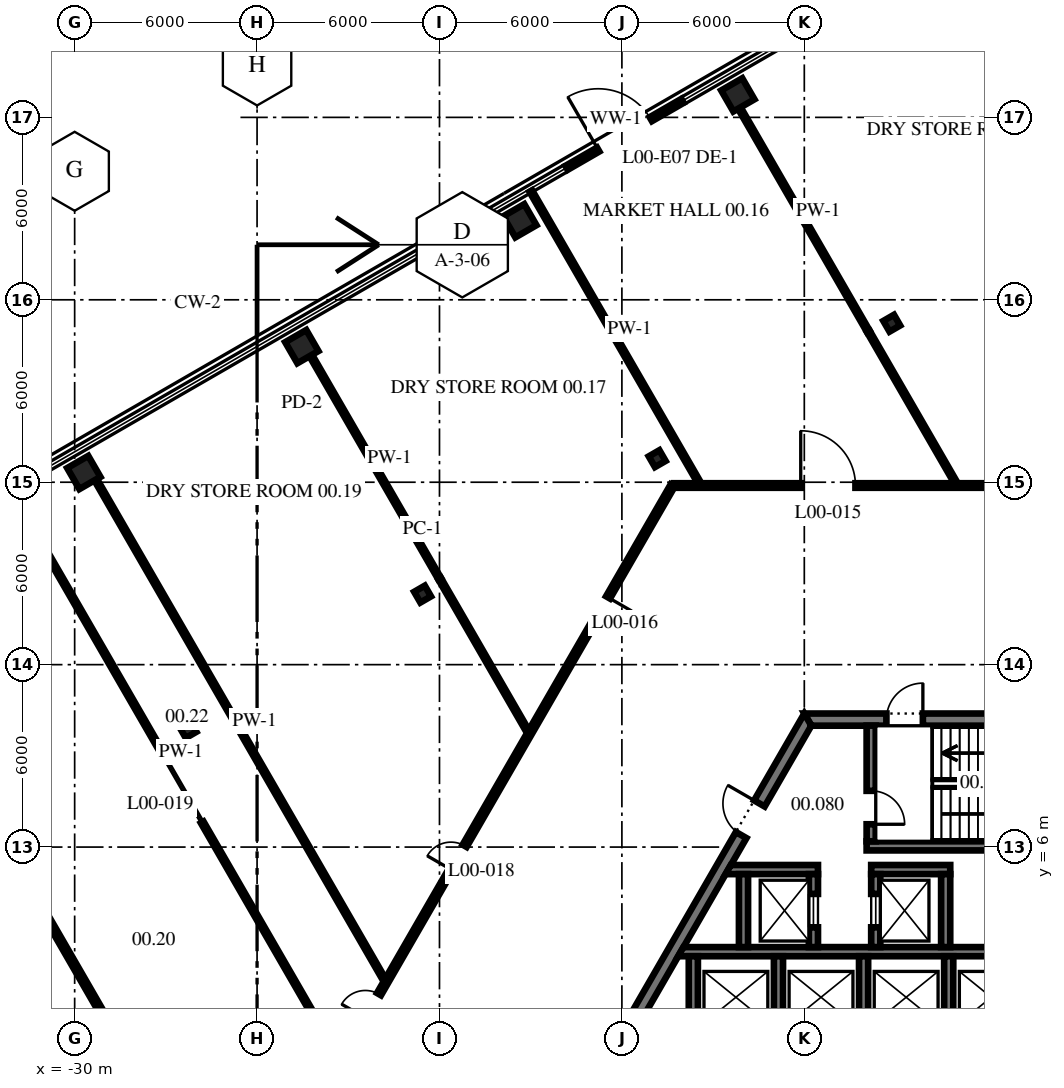
"""IFC4 building model, lengths in metres.
Left out: names, types, materials, properties, quantities, classifications, styles, units other than length and angle.
Written with IfcOpenShell. Run it as: python <this file> out.ifc"""

import sys

from ifc_helpers import new_model, si_unit, direction, frame, frame_2d, origin, origin_2d, place, context, subcontext, project, spatial, polyline, rectangle, i_section, outline, extrude, source, transform, mapped, element, fill, save


model = new_model("IFC4")
c1 = context("Model", 3, precision=1e-05, world=origin(), true_north=direction((0.0, 1.0)))
c2 = subcontext(c1, "Body", "Model", "MODEL_VIEW")
j1 = project(units=[si_unit("LENGTHUNIT", "METRE"), si_unit("PLANEANGLEUNIT", "RADIAN")], contexts=[c1])
p1 = place(None, origin())
s1 = spatial("IfcSite", under=j1, at=p1, CompositionType="ELEMENT")
p2 = place(p1, origin())
s2 = spatial("IfcBuilding", under=s1, at=p2, CompositionType="ELEMENT")
p3 = place(p2, origin())
s3 = spatial("IfcBuildingStorey", under=s2, at=p3, CompositionType="ELEMENT", Elevation=0.0)
m1 = source(origin(), c2, "Body", "SweptSolid", [
    extrude(i_section(OverallWidth=0.404, OverallDepth=0.406, WebThickness=0.027, FlangeThickness=0.044, at=origin_2d()), origin(), (0.0, 0.0, 1.0), 7.2),
])
for number, where, z_axis, x_axis in (
    (1, (-3.124, 23.23, -0.2), (0.0, 0.0, 1.0), (-0.866, -0.5, 0.0)),
    (2, (-10.84, 18.775, -0.2), (0.0, 0.0, 1.0), (-0.866, -0.5, 0.0)),
    (3, (-18.556, 14.32, -0.2), (0.0, 0.0, 1.0), (-0.866, -0.5, 0.0)),
    (4, (-26.272, 9.865, -0.2), (0.0, 0.0, 1.0), (-0.866, -0.5, 0.0)),
):
    element("IfcColumn", number, at=place(p3, frame(where, z_axis=z_axis, x_axis=x_axis)), inside=s3, PredefinedType="COLUMN", context=c2, shape_type="MappedRepresentation", body=[
        mapped(m1, transform((0.0, 0.0, 0.0), scale=1.0)),
    ])
m2 = source(origin(), c2, "Body", "SweptSolid", [
    extrude(rectangle(XDim=0.8, YDim=0.8, at=origin_2d()), origin(), (0.0, 0.0, 1.0), 7.2),
])
for number, where, z_axis, x_axis in (
    (5, (-8.187, 30.74, -0.2), (0.0, 0.0, 1.0), (-0.866, -0.5, 0.0)),
    (6, (-15.357, 26.6, -0.2), (0.0, 0.0, 1.0), (-0.866, -0.5, 0.0)),
    (7, (-22.528, 22.46, -0.2), (0.0, 0.0, 1.0), (-0.866, -0.5, 0.0)),
    (8, (-29.699, 18.32, -0.2), (0.0, 0.0, 1.0), (-0.866, -0.5, 0.0)),
):
    element("IfcColumn", number, at=place(p3, frame(where, z_axis=z_axis, x_axis=x_axis)), inside=s3, PredefinedType="COLUMN", context=c2, shape_type="MappedRepresentation", body=[
        mapped(m2, transform((0.0, 0.0, 0.0), scale=1.0)),
    ])
m3 = source(origin(), c2, "Body", "SweptSolid", [
    extrude(outline(polyline([(-0.115, -0.2), (11.885, -0.2), (11.654, 0.2), (0.115, 0.2), (-0.115, -0.2)])), origin(), (0.0, 0.0, 1.0), 7.0),
])
p4 = place(p3, frame((5.885, 10.192, -0.2), z_axis=(0.0, 0.0, 1.0), x_axis=(-1.0, 0.0, 0.0)))
e9 = element("IfcWall", 9, at=p4, inside=s3, PredefinedType="SHEAR", context=c2, shape_type="MappedRepresentation", body=[
    mapped(m3, transform((0.0, 0.0, 0.0), scale=1.0)),
])
p5 = place(p4, frame((7.985, 0.0, 0.2)))
e10 = element("IfcOpeningElement", 10, at=p5, cuts=e9, PredefinedType="OPENING", context=c2, shape_type="SweptSolid", body=[
    extrude(rectangle(XDim=1.2, YDim=2.1, at=frame_2d((0.6, 1.05))), frame((0.0, 0.21, 0.0), z_axis=(0.0, -1.0, 0.0), x_axis=(1.0, 0.0, 0.0)), (0.0, 0.0, 1.0), 0.42),
])
p6 = place(p3, frame((-5.885, 10.192, -0.2), z_axis=(0.0, 0.0, 1.0), x_axis=(-0.499996592174, -0.866027371285, 0.0)))
e11 = element("IfcWall", 11, at=p6, inside=s3, PredefinedType="SHEAR", context=c2, shape_type="MappedRepresentation", body=[
    mapped(m3, transform((0.0, 0.0, 0.0), scale=1.0)),
])
p7 = place(p6, frame((3.185, 0.0, 0.2)))
e12 = element("IfcOpeningElement", 12, at=p7, cuts=e11, PredefinedType="OPENING", context=c2, shape_type="SweptSolid", body=[
    extrude(rectangle(XDim=1.2, YDim=2.1, at=frame_2d((0.6, 1.05))), frame((0.0, 0.21, 0.0), z_axis=(0.0, -1.0, 0.0), x_axis=(1.0, 0.0, 0.0)), (0.0, 0.0, 1.0), 0.42),
])
p8 = place(p3, frame((-9.8, 2.56, -0.2), z_axis=(0.0, 0.0, 1.0), x_axis=(1.0, 0.0, 0.0)))
e13 = element("IfcWall", 13, at=p8, inside=s3, PredefinedType="SHEAR", context=c2, shape_type="SweptSolid", body=[
    extrude(outline(polyline([(11.2, -0.15), (-0.349, -0.15), (-0.176, 0.15), (11.2, 0.15), (11.2, -0.15)])), origin(), (0.0, 0.0, 1.0), 7.0),
])
m4 = source(origin(), c2, "Body", "SweptSolid", [
    extrude(rectangle(XDim=2.2, YDim=0.3, at=frame_2d((1.1, 0.0))), origin(), (0.0, 0.0, 1.0), 7.0),
])
p9 = place(p3, frame((-9.65, 0.21, -0.2), z_axis=(0.0, 0.0, 1.0), x_axis=(0.0, 1.0, 0.0)))
e14 = element("IfcWall", 14, at=p9, inside=s3, PredefinedType="SHEAR", context=c2, shape_type="MappedRepresentation", body=[
    mapped(m4, transform((0.0, 0.0, 0.0), scale=1.0)),
])
p10 = place(p3, frame((-3.95, 6.04, -0.2), z_axis=(0.0, 0.0, 1.0), x_axis=(1.0, 0.0, 0.0)))
e15 = element("IfcWall", 15, at=p10, inside=s3, PredefinedType="SHEAR", context=c2, shape_type="SweptSolid", body=[
    extrude(rectangle(XDim=7.9, YDim=0.3, at=frame_2d((3.95, 0.0))), origin(), (0.0, 0.0, 1.0), 7.0),
])
m5 = source(origin(), c2, "Body", "SweptSolid", [
    extrude(outline(polyline([(0.0, -0.15), (0.0, 0.15), (3.804, 0.15), (3.804, -0.15), (0.0, -0.15)])), origin(), (0.0, 0.0, 1.0), 7.0),
])
p11 = place(p3, frame((-3.8, 6.19, -0.2), z_axis=(0.0, 0.0, 1.0), x_axis=(0.0, 1.0, 0.0)))
e16 = element("IfcWall", 16, at=p11, inside=s3, PredefinedType="SHEAR", context=c2, shape_type="MappedRepresentation", body=[
    mapped(m5, transform((0.0, 0.0, 0.0), scale=1.0)),
])
p12 = place(p11, frame((0.56, 0.0, 0.2)))
e17 = element("IfcOpeningElement", 17, at=p12, cuts=e16, PredefinedType="OPENING", context=c2, shape_type="SweptSolid", body=[
    extrude(rectangle(XDim=1.1, YDim=2.1, at=frame_2d((0.55, 1.05))), frame((0.0, 0.16, 0.0), z_axis=(0.0, -1.0, 0.0), x_axis=(1.0, 0.0, 0.0)), (0.0, 0.0, 1.0), 0.32),
])
p13 = place(p3, frame((-8.15, 5.26, -0.2), z_axis=(0.0, 0.0, 1.0), x_axis=(1.0, 0.0, 0.0)))
e18 = element("IfcWall", 18, at=p13, inside=s3, PredefinedType="SHEAR", context=c2, shape_type="SweptSolid", body=[
    extrude(outline(polyline([(2.6, -0.15), (-0.44, -0.15), (-0.267, 0.15), (2.6, 0.15), (2.6, -0.15)])), origin(), (0.0, 0.0, 1.0), 7.0),
])
m6 = source(origin(), c2, "Body", "SweptSolid", [
    extrude(rectangle(XDim=2.4, YDim=0.3, at=frame_2d((1.2, 0.0))), origin(), (0.0, 0.0, 1.0), 7.0),
])
p14 = place(p3, frame((-8.0, 2.71, -0.2), z_axis=(0.0, 0.0, 1.0), x_axis=(0.0, 1.0, 0.0)))
e19 = element("IfcWall", 19, at=p14, inside=s3, PredefinedType="SHEAR", context=c2, shape_type="MappedRepresentation", body=[
    mapped(m6, transform((0.0, 0.0, 0.0), scale=1.0)),
])
p15 = place(p3, frame((-5.7, 2.71, -0.2), z_axis=(0.0, 0.0, 1.0), x_axis=(0.0, 1.0, 0.0)))
e20 = element("IfcWall", 20, at=p15, inside=s3, PredefinedType="SHEAR", context=c2, shape_type="MappedRepresentation", body=[
    mapped(m6, transform((0.0, 0.0, 0.0), scale=1.0)),
])
p16 = place(p15, frame((0.65, 0.0, 0.2)))
e21 = element("IfcOpeningElement", 21, at=p16, cuts=e20, PredefinedType="OPENING", context=c2, shape_type="SweptSolid", body=[
    extrude(rectangle(XDim=1.1, YDim=2.1, at=frame_2d((0.55, 1.05))), frame((0.0, 0.16, 0.0), z_axis=(0.0, -1.0, 0.0), x_axis=(1.0, 0.0, 0.0)), (0.0, 0.0, 1.0), 0.32),
])
p17 = place(p3, frame((-3.8, 5.26, -0.2), z_axis=(0.0, 0.0, 1.0), x_axis=(1.0, 0.0, 0.0)))
e22 = element("IfcWall", 22, at=p17, inside=s3, PredefinedType="SHEAR", context=c2, shape_type="SweptSolid", body=[
    extrude(rectangle(XDim=2.6, YDim=0.3, at=frame_2d((1.3, 0.0))), origin(), (0.0, 0.0, 1.0), 7.0),
])
p18 = place(p3, frame((-3.65, 2.71, -0.2), z_axis=(0.0, 0.0, 1.0), x_axis=(0.0, 1.0, 0.0)))
e23 = element("IfcWall", 23, at=p18, inside=s3, PredefinedType="SHEAR", context=c2, shape_type="MappedRepresentation", body=[
    mapped(m6, transform((0.0, 0.0, 0.0), scale=1.0)),
])
p19 = place(p18, frame((0.65, 0.0, 0.2)))
e24 = element("IfcOpeningElement", 24, at=p19, cuts=e23, PredefinedType="OPENING", context=c2, shape_type="SweptSolid", body=[
    extrude(rectangle(XDim=1.1, YDim=2.1, at=frame_2d((0.55, 1.05))), frame((0.0, 0.16, 0.0), z_axis=(0.0, -1.0, 0.0), x_axis=(1.0, 0.0, 0.0)), (0.0, 0.0, 1.0), 0.32),
])
p20 = place(p3, frame((-1.35, 2.71, -0.2), z_axis=(0.0, 0.0, 1.0), x_axis=(0.0, 1.0, 0.0)))
e25 = element("IfcWall", 25, at=p20, inside=s3, PredefinedType="SHEAR", context=c2, shape_type="MappedRepresentation", body=[
    mapped(m6, transform((0.0, 0.0, 0.0), scale=1.0)),
])
for number, where, z_axis, x_axis in (
    (26, (-6.85, 0.21, -0.2), (0.0, 0.0, 1.0), (0.0, 1.0, 0.0)),
    (27, (-4.05, 0.21, -0.2), (0.0, 0.0, 1.0), (0.0, 1.0, 0.0)),
    (28, (-1.25, 0.21, -0.2), (0.0, 0.0, 1.0), (0.0, 1.0, 0.0)),
):
    element("IfcWall", number, at=place(p3, frame(where, z_axis=z_axis, x_axis=x_axis)), inside=s3, PredefinedType="SHEAR", context=c2, shape_type="MappedRepresentation", body=[
        mapped(m4, transform((0.0, 0.0, 0.0), scale=1.0)),
    ])
p21 = place(p3, frame((-13.821, 28.341, 0.0), z_axis=(0.0, 0.0, 1.0), x_axis=(0.866012896985, 0.500021661786, 0.0)))
e29 = element("IfcWall", 29, at=p21, inside=s3, PredefinedType="ELEMENTEDWALL", context=c2, shape_type="SweptSolid", body=[
    extrude(rectangle(XDim=4.403, YDim=0.15, at=frame_2d((2.201, 0.0))), origin(), (0.0, 0.0, 1.0), 6.8),
])
p22 = place(p21, frame((1.201, 0.0, 0.0)))
e30 = element("IfcOpeningElement", 30, at=p22, cuts=e29, PredefinedType="OPENING", context=c2, shape_type="SweptSolid", body=[
    extrude(rectangle(XDim=2.0, YDim=2.7, at=frame_2d((1.0, 1.35))), frame((0.0, 0.085, 0.0), z_axis=(0.0, -1.0, 0.0), x_axis=(1.0, 0.0, 0.0)), (0.0, 0.0, 1.0), 0.17),
])
p23 = place(p3, frame((-32.507, 6.444, 0.0), z_axis=(0.0, 0.0, 1.0), x_axis=(0.499996054018, -0.866027681987, 0.0)))
e31 = element("IfcWall", 31, at=p23, inside=s3, PredefinedType="PARTITIONING", context=c2, shape_type="SweptSolid", body=[
    extrude(rectangle(XDim=7.441, YDim=0.15, at=frame_2d((3.72, 0.0))), origin(), (0.0, 0.0, 1.0), 6.8),
])
p24 = place(p3, frame((-32.092, 17.705, 0.0), z_axis=(0.0, 0.0, 1.0), x_axis=(0.500005001938, -0.866022515895, 0.0)))
e32 = element("IfcWall", 32, at=p24, inside=s3, PredefinedType="PARTITIONING", context=c2, shape_type="SweptSolid", body=[
    extrude(rectangle(XDim=20.444, YDim=0.1, at=frame_2d((10.222, 0.0))), origin(), (0.0, 0.0, 1.0), 6.8),
])
p25 = place(p24, frame((10.175, 0.0, 0.0)))
e33 = element("IfcOpeningElement", 33, at=p25, cuts=e32, PredefinedType="OPENING", context=c2, shape_type="SweptSolid", body=[
    extrude(rectangle(XDim=2.4, YDim=2.4, at=frame_2d((1.2, 1.2))), frame((0.0, 0.06, 0.0), z_axis=(0.0, -1.0, 0.0), x_axis=(1.0, 0.0, 0.0)), (0.0, 0.0, 1.0), 0.12),
])
p26 = place(p3, frame((-29.313, 18.092, 0.0), z_axis=(0.0, 0.0, 1.0), x_axis=(0.499998542569, -0.866026245231, 0.0)))
e34 = element("IfcWall", 34, at=p26, inside=s3, PredefinedType="PARTITIONING", context=c2, shape_type="SweptSolid", body=[
    extrude(rectangle(XDim=19.009, YDim=0.1, at=frame_2d((9.504, 0.0))), origin(), (0.0, 0.0, 1.0), 6.8),
])
p27 = place(p3, frame((-22.238, 22.177, 0.0), z_axis=(0.0, 0.0, 1.0), x_axis=(0.500007862672, -0.866020864221, 0.0)))
e35 = element("IfcWall", 35, at=p27, inside=s3, PredefinedType="PARTITIONING", context=c2, shape_type="SweptSolid", body=[
    extrude(rectangle(XDim=8.49, YDim=0.1, at=frame_2d((4.245, 0.0))), origin(), (0.0, 0.0, 1.0), 6.028),
])
p28 = place(p3, frame((-17.993, 14.824, 0.0), z_axis=(0.0, 0.0, 1.0), x_axis=(0.500009032223, -0.866020188965, 0.0)))
e36 = element("IfcWall", 36, at=p28, inside=s3, PredefinedType="PARTITIONING", context=c2, shape_type="SweptSolid", body=[
    extrude(rectangle(XDim=5.801, YDim=0.1, at=frame_2d((2.901, 0.0))), origin(), (0.0, 0.0, 1.0), 6.8),
])
p29 = place(p3, frame((-14.995, 27.576, 0.0), z_axis=(0.0, 0.0, 1.0), x_axis=(0.499993005702, -0.866029441907, 0.0)))
e37 = element("IfcWall", 37, at=p29, inside=s3, PredefinedType="PARTITIONING", context=c2, shape_type="SweptSolid", body=[
    extrude(rectangle(XDim=11.092, YDim=0.1, at=frame_2d((5.546, 0.0))), origin(), (0.0, 0.0, 1.0), 6.8),
])
p30 = place(p3, frame((-8.141, 30.316, 0.0), z_axis=(0.0, 0.0, 1.0), x_axis=(0.499995411839, -0.866028052744, 0.0)))
e38 = element("IfcWall", 38, at=p30, inside=s3, PredefinedType="PARTITIONING", context=c2, shape_type="SweptSolid", body=[
    extrude(rectangle(XDim=8.491, YDim=0.1, at=frame_2d((4.245, 0.0))), origin(), (0.0, 0.0, 1.0), 6.028),
])
p31 = place(p3, frame((-3.896, 22.963, 0.0), z_axis=(0.0, 0.0, 1.0), x_axis=(0.500019361804, -0.866014224953, 0.0)))
e39 = element("IfcWall", 39, at=p31, inside=s3, PredefinedType="PARTITIONING", context=c2, shape_type="SweptSolid", body=[
    extrude(rectangle(XDim=5.765, YDim=0.1, at=frame_2d((2.883, 0.0))), origin(), (0.0, 0.0, 1.0), 6.8),
])
p32 = place(p3, frame((-10.28, 17.892, 0.0), z_axis=(0.0, 0.0, 1.0), x_axis=(1.0, 0.0, 0.0)))
e40 = element("IfcWall", 40, at=p32, inside=s3, PredefinedType="PARTITIONING", context=c2, shape_type="SweptSolid", body=[
    extrude(rectangle(XDim=20.608, YDim=0.15, at=frame_2d((10.304, 0.0))), origin(), (0.0, 0.0, 1.0), 6.8),
])
p33 = place(p32, frame((4.162, 0.0, 0.0)))
e41 = element("IfcOpeningElement", 41, at=p33, cuts=e40, PredefinedType="OPENING", context=c2, shape_type="SweptSolid", body=[
    extrude(rectangle(XDim=1.8, YDim=2.4, at=frame_2d((0.9, 1.2))), frame((0.0, 0.085, 0.0), z_axis=(0.0, -1.0, 0.0), x_axis=(1.0, 0.0, 0.0)), (0.0, 0.0, 1.0), 0.17),
])
p34 = place(p32, frame((14.56, 0.0, 0.0)))
e42 = element("IfcOpeningElement", 42, at=p34, cuts=e40, PredefinedType="OPENING", context=c2, shape_type="SweptSolid", body=[
    extrude(rectangle(XDim=0.9, YDim=2.1, at=frame_2d((0.45, 1.05))), frame((0.0, 0.085, 0.0), z_axis=(0.0, -1.0, 0.0), x_axis=(1.0, 0.0, 0.0)), (0.0, 0.0, 1.0), 0.17),
])
p35 = place(p3, frame((-20.66, 0.0, 0.0), z_axis=(0.0, 0.0, 1.0), x_axis=(0.500006476997, 0.866021664256, 0.0)))
e43 = element("IfcWall", 43, at=p35, inside=s3, PredefinedType="PARTITIONING", context=c2, shape_type="SweptSolid", body=[
    extrude(rectangle(XDim=20.66, YDim=0.15, at=frame_2d((10.33, 0.0))), origin(), (0.0, 0.0, 1.0), 6.8),
])
p36 = place(p35, frame((15.51, 0.0, 0.0)))
e44 = element("IfcOpeningElement", 44, at=p36, cuts=e43, PredefinedType="OPENING", context=c2, shape_type="SweptSolid", body=[
    extrude(rectangle(XDim=0.9, YDim=2.1, at=frame_2d((0.45, 1.05))), frame((0.0, 0.085, 0.0), z_axis=(0.0, -1.0, 0.0), x_axis=(1.0, 0.0, 0.0)), (0.0, 0.0, 1.0), 0.17),
])
p37 = place(p35, frame((6.076, 0.0, 0.0)))
e45 = element("IfcOpeningElement", 45, at=p37, cuts=e43, PredefinedType="OPENING", context=c2, shape_type="SweptSolid", body=[
    extrude(rectangle(XDim=0.9, YDim=2.1, at=frame_2d((0.45, 1.05))), frame((0.0, 0.085, 0.0), z_axis=(0.0, -1.0, 0.0), x_axis=(1.0, 0.0, 0.0)), (0.0, 0.0, 1.0), 0.17),
])
p38 = place(p35, frame((0.442, 0.0, 0.0)))
e46 = element("IfcOpeningElement", 46, at=p38, cuts=e43, PredefinedType="OPENING", context=c2, shape_type="SweptSolid", body=[
    extrude(rectangle(XDim=0.9, YDim=2.1, at=frame_2d((0.45, 1.05))), frame((0.0, 0.085, 0.0), z_axis=(0.0, -1.0, 0.0), x_axis=(1.0, 0.0, 0.0)), (0.0, 0.0, 1.0), 0.17),
])
p39 = place(p5, frame((1.2, 0.0, 0.0), z_axis=(0.0, 0.0, 1.0), x_axis=(-1.0, 0.0, 0.0)))
e47 = element("IfcDoor", 47, at=p39, inside=s3, OperationType="SINGLE_SWING_RIGHT", PredefinedType="DOOR", context=c2, shape_type="SweptSolid", body=[
    extrude(rectangle(XDim=1.2, YDim=2.1, at=frame_2d((0.6, 1.05))), frame((0.0, 0.025, 0.0), z_axis=(0.0, -1.0, 0.0), x_axis=(1.0, 0.0, 0.0)), (0.0, 0.0, 1.0), 0.05),
])
fill(e10, e47)
p40 = place(p7, frame((1.2, 0.0, 0.0), z_axis=(0.0, 0.0, 1.0), x_axis=(-1.0, 0.0, 0.0)))
e48 = element("IfcDoor", 48, at=p40, inside=s3, OperationType="SINGLE_SWING_RIGHT", PredefinedType="DOOR", context=c2, shape_type="SweptSolid", body=[
    extrude(rectangle(XDim=1.2, YDim=2.1, at=frame_2d((0.6, 1.05))), frame((0.0, 0.025, 0.0), z_axis=(0.0, -1.0, 0.0), x_axis=(1.0, 0.0, 0.0)), (0.0, 0.0, 1.0), 0.05),
])
fill(e12, e48)
p41 = place(p12, frame((1.1, 0.0, 0.0), z_axis=(0.0, 0.0, 1.0), x_axis=(-1.0, 0.0, 0.0)))
e49 = element("IfcDoor", 49, at=p41, inside=s3, OperationType="SINGLE_SWING_RIGHT", PredefinedType="DOOR", context=c2, shape_type="SweptSolid", body=[
    extrude(rectangle(XDim=1.1, YDim=2.1, at=frame_2d((0.55, 1.05))), frame((0.0, 0.025, 0.0), z_axis=(0.0, -1.0, 0.0), x_axis=(1.0, 0.0, 0.0)), (0.0, 0.0, 1.0), 0.05),
])
fill(e17, e49)
p42 = place(p16, origin())
e50 = element("IfcDoor", 50, at=p42, inside=s3, OperationType="DOUBLE_DOOR_SLIDING", PredefinedType="DOOR", context=c2, shape_type="SweptSolid", body=[
    extrude(rectangle(XDim=1.1, YDim=2.1, at=frame_2d((0.55, 1.05))), frame((0.0, 0.025, 0.0), z_axis=(0.0, -1.0, 0.0), x_axis=(1.0, 0.0, 0.0)), (0.0, 0.0, 1.0), 0.05),
])
fill(e21, e50)
p43 = place(p19, origin())
e51 = element("IfcDoor", 51, at=p43, inside=s3, OperationType="DOUBLE_DOOR_SLIDING", PredefinedType="DOOR", context=c2, shape_type="SweptSolid", body=[
    extrude(rectangle(XDim=1.1, YDim=2.1, at=frame_2d((0.55, 1.05))), frame((0.0, 0.025, 0.0), z_axis=(0.0, -1.0, 0.0), x_axis=(1.0, 0.0, 0.0)), (0.0, 0.0, 1.0), 0.05),
])
fill(e24, e51)
p44 = place(p22, origin())
e52 = element("IfcDoor", 52, at=p44, inside=s3, OperationType="DOUBLE_DOOR_SINGLE_SWING", PredefinedType="DOOR", context=c2, shape_type="SweptSolid", body=[
    extrude(rectangle(XDim=2.0, YDim=2.7, at=frame_2d((1.0, 1.35))), frame((0.0, 0.025, 0.0), z_axis=(0.0, -1.0, 0.0), x_axis=(1.0, 0.0, 0.0)), (0.0, 0.0, 1.0), 0.05),
])
fill(e30, e52)
p45 = place(p33, origin())
e53 = element("IfcDoor", 53, at=p45, inside=s3, OperationType="DOUBLE_DOOR_SINGLE_SWING", PredefinedType="DOOR", context=c2, shape_type="SweptSolid", body=[
    extrude(rectangle(XDim=1.8, YDim=2.4, at=frame_2d((0.9, 1.2))), frame((0.0, 0.025, 0.0), z_axis=(0.0, -1.0, 0.0), x_axis=(1.0, 0.0, 0.0)), (0.0, 0.0, 1.0), 0.05),
])
fill(e41, e53)
p46 = place(p36, origin())
e54 = element("IfcDoor", 54, at=p46, inside=s3, OperationType="SINGLE_SWING_RIGHT", PredefinedType="DOOR", context=c2, shape_type="SweptSolid", body=[
    extrude(rectangle(XDim=0.9, YDim=2.1, at=frame_2d((0.45, 1.05))), frame((0.0, 0.025, 0.0), z_axis=(0.0, -1.0, 0.0), x_axis=(1.0, 0.0, 0.0)), (0.0, 0.0, 1.0), 0.05),
])
fill(e44, e54)
p47 = place(p37, origin())
e55 = element("IfcDoor", 55, at=p47, inside=s3, OperationType="SINGLE_SWING_LEFT", PredefinedType="DOOR", context=c2, shape_type="SweptSolid", body=[
    extrude(rectangle(XDim=0.9, YDim=2.1, at=frame_2d((0.45, 1.05))), frame((0.0, 0.025, 0.0), z_axis=(0.0, -1.0, 0.0), x_axis=(1.0, 0.0, 0.0)), (0.0, 0.0, 1.0), 0.05),
])
fill(e45, e55)
p48 = place(p25, origin())
e56 = element("IfcDoor", 56, at=p48, inside=s3, OperationType="ROLLINGUP", PredefinedType="DOOR", context=c2, shape_type="SweptSolid", body=[
    extrude(rectangle(XDim=2.4, YDim=2.4, at=frame_2d((1.2, 1.2))), frame((0.0, 0.025, 0.0), z_axis=(0.0, -1.0, 0.0), x_axis=(1.0, 0.0, 0.0)), (0.0, 0.0, 1.0), 0.05),
])
fill(e33, e56)
p49 = place(p38, origin())
e57 = element("IfcDoor", 57, at=p49, inside=s3, OperationType="SINGLE_SWING_LEFT", PredefinedType="DOOR", context=c2, shape_type="SweptSolid", body=[
    extrude(rectangle(XDim=0.9, YDim=2.1, at=frame_2d((0.45, 1.05))), frame((0.0, 0.025, 0.0), z_axis=(0.0, -1.0, 0.0), x_axis=(1.0, 0.0, 0.0)), (0.0, 0.0, 1.0), 0.05),
])
fill(e46, e57)
save(model, sys.argv[1])
